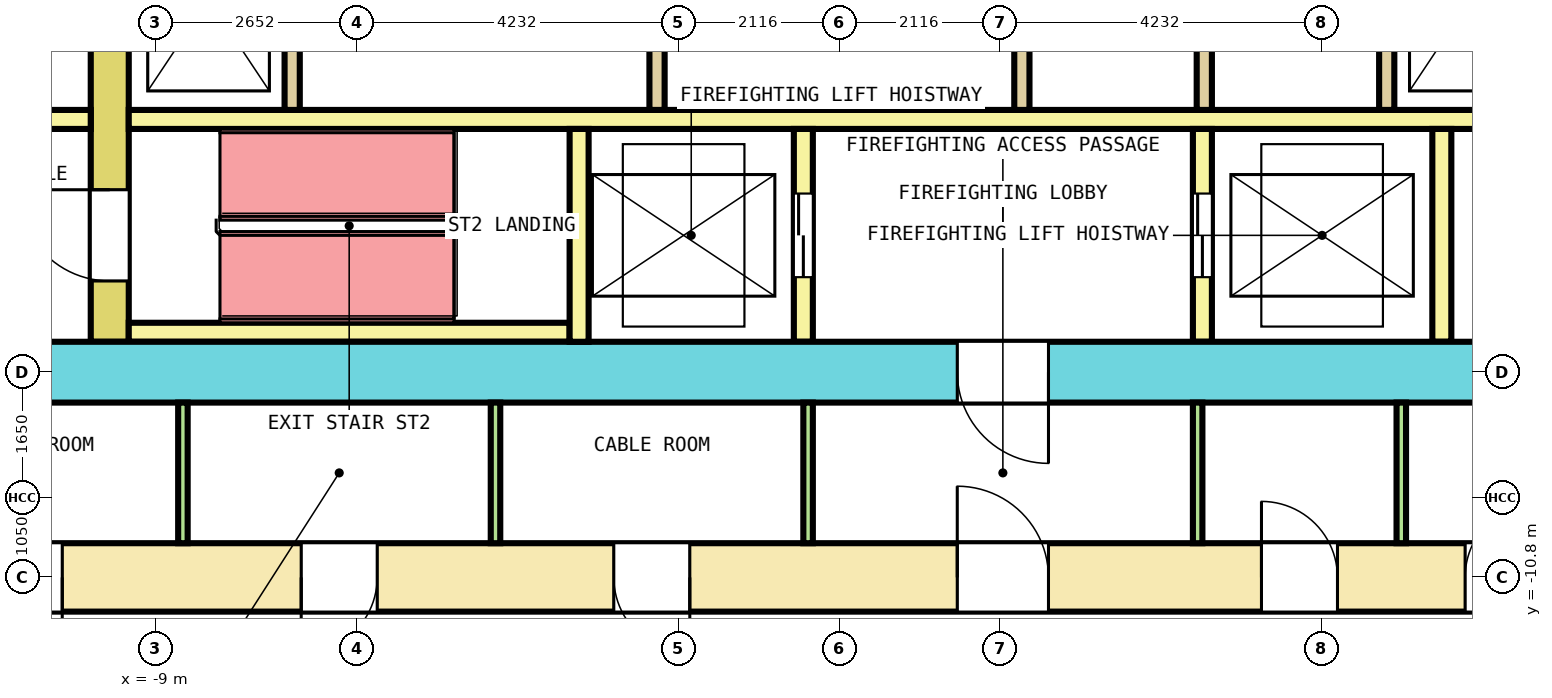
"""IFC4 building model, lengths in metres.
Left out: names, types, materials, properties, quantities, classifications, styles, units other than length and angle.
Written with IfcOpenShell. Run it as: python <this file> out.ifc"""

import sys

from ifc_helpers import new_model, si_unit, direction, frame, frame_2d, origin, place, context, subcontext, project, spatial, rectangle, extrude, element, fill, save


model = new_model("IFC4")
c1 = context("Model", 3, precision=1e-05, world=origin(), true_north=direction((0.0, 1.0)))
c2 = subcontext(c1, "Body", "Model", "MODEL_VIEW")
j1 = project(units=[si_unit("LENGTHUNIT", "METRE"), si_unit("PLANEANGLEUNIT", "RADIAN")], contexts=[c1])
p1 = place(None, origin())
s1 = spatial("IfcSite", under=j1, at=p1, CompositionType="ELEMENT")
p2 = place(p1, origin())
s2 = spatial("IfcBuilding", under=s1, at=p2, CompositionType="ELEMENT")
p3 = place(p2, frame((0.0, 0.0, 23.4)))
s3 = spatial("IfcBuildingStorey", under=s2, at=p3, CompositionType="ELEMENT", Elevation=23.4)
p4 = place(p3, frame((-13.65, -10.8, 0.0), z_axis=(0.0, 0.0, 1.0), x_axis=(1.0, 0.0, 0.0)))
e1 = element("IfcWall", 1, at=p4, inside=s3, PredefinedType="SHEAR", context=c2, shape_type="SweptSolid", body=[
    extrude(rectangle(XDim=27.3, YDim=0.9, at=frame_2d((13.65, 0.0))), origin(), (0.0, 0.0, 1.0), 4.1),
])
p5 = place(p4, frame((2.425, 0.0, 0.0)))
e2 = element("IfcOpeningElement", 2, at=p5, cuts=e1, PredefinedType="OPENING", context=c2, shape_type="SweptSolid", body=[
    extrude(rectangle(XDim=1.0, YDim=2.1, at=frame_2d((0.5, 1.05))), frame((0.0, 0.46, 0.0), z_axis=(0.0, -1.0, 0.0), x_axis=(1.0, 0.0, 0.0)), (0.0, 0.0, 1.0), 0.92),
])
p6 = place(p4, frame((6.569, 0.0, 0.0)))
e3 = element("IfcOpeningElement", 3, at=p6, cuts=e1, PredefinedType="OPENING", context=c2, shape_type="SweptSolid", body=[
    extrude(rectangle(XDim=1.0, YDim=2.1, at=frame_2d((0.5, 1.05))), frame((0.0, 0.46, 0.0), z_axis=(0.0, -1.0, 0.0), x_axis=(1.0, 0.0, 0.0)), (0.0, 0.0, 1.0), 0.92),
])
p7 = place(p4, frame((10.681, 0.0, 0.0)))
e4 = element("IfcOpeningElement", 4, at=p7, cuts=e1, PredefinedType="OPENING", context=c2, shape_type="SweptSolid", body=[
    extrude(rectangle(XDim=1.0, YDim=2.1, at=frame_2d((0.5, 1.05))), frame((0.0, 0.46, 0.0), z_axis=(0.0, -1.0, 0.0), x_axis=(1.0, 0.0, 0.0)), (0.0, 0.0, 1.0), 0.92),
])
p8 = place(p4, frame((19.202, 0.0, 0.0)))
e5 = element("IfcOpeningElement", 5, at=p8, cuts=e1, PredefinedType="OPENING", context=c2, shape_type="SweptSolid", body=[
    extrude(rectangle(XDim=1.0, YDim=2.1, at=frame_2d((0.5, 1.05))), frame((0.0, 0.46, 0.0), z_axis=(0.0, -1.0, 0.0), x_axis=(1.0, 0.0, 0.0)), (0.0, 0.0, 1.0), 0.92),
])
p9 = place(p4, frame((21.881, 0.0, 0.0)))
e6 = element("IfcOpeningElement", 6, at=p9, cuts=e1, PredefinedType="OPENING", context=c2, shape_type="SweptSolid", body=[
    extrude(rectangle(XDim=1.0, YDim=2.1, at=frame_2d((0.5, 1.05))), frame((0.0, 0.46, 0.0), z_axis=(0.0, -1.0, 0.0), x_axis=(1.0, 0.0, 0.0)), (0.0, 0.0, 1.0), 0.92),
])
p10 = place(p4, frame((24.592, 0.0, 0.0)))
e7 = element("IfcOpeningElement", 7, at=p10, cuts=e1, PredefinedType="OPENING", context=c2, shape_type="SweptSolid", body=[
    extrude(rectangle(XDim=1.0, YDim=2.1, at=frame_2d((0.5, 1.05))), frame((0.0, 0.46, 0.0), z_axis=(0.0, -1.0, 0.0), x_axis=(1.0, 0.0, 0.0)), (0.0, 0.0, 1.0), 0.92),
])
p11 = place(p4, frame((15.2, 0.0, 0.0)))
e8 = element("IfcOpeningElement", 8, at=p11, cuts=e1, PredefinedType="OPENING", context=c2, shape_type="SweptSolid", body=[
    extrude(rectangle(XDim=1.2, YDim=2.1, at=frame_2d((0.6, 1.05))), frame((0.0, 0.46, 0.0), z_axis=(0.0, -1.0, 0.0), x_axis=(1.0, 0.0, 0.0)), (0.0, 0.0, 1.0), 0.92),
])
p12 = place(p3, frame((-12.75, -8.1, 0.0), z_axis=(0.0, 0.0, 1.0), x_axis=(1.0, 0.0, 0.0)))
e9 = element("IfcWall", 9, at=p12, inside=s3, PredefinedType="SHEAR", context=c2, shape_type="SweptSolid", body=[
    extrude(rectangle(XDim=25.5, YDim=0.8, at=frame_2d((12.75, 0.0))), origin(), (0.0, 0.0, 1.0), 4.1),
])
p13 = place(p12, frame((14.3, 0.0, 0.0)))
e10 = element("IfcOpeningElement", 10, at=p13, cuts=e9, PredefinedType="OPENING", context=c2, shape_type="SweptSolid", body=[
    extrude(rectangle(XDim=1.2, YDim=2.1, at=frame_2d((0.6, 1.05))), frame((0.0, 0.41, 0.0), z_axis=(0.0, -1.0, 0.0), x_axis=(1.0, 0.0, 0.0)), (0.0, 0.0, 1.0), 0.82),
])
p14 = place(p3, frame((-9.6, -7.7, 0.0), z_axis=(0.0, 0.0, 1.0), x_axis=(0.0, 1.0, 0.0)))
e11 = element("IfcWall", 11, at=p14, inside=s3, PredefinedType="SHEAR", context=c2, shape_type="SweptSolid", body=[
    extrude(rectangle(XDim=15.4, YDim=0.5, at=frame_2d((7.7, 0.0))), origin(), (0.0, 0.0, 1.0), 4.1),
])
p15 = place(p14, frame((6.5, 0.0, 0.0)))
e12 = element("IfcOpeningElement", 12, at=p15, cuts=e11, PredefinedType="OPENING", context=c2, shape_type="SweptSolid", body=[
    extrude(rectangle(XDim=2.4, YDim=2.1, at=frame_2d((1.2, 1.05))), frame((0.0, 0.26, 0.0), z_axis=(0.0, -1.0, 0.0), x_axis=(1.0, 0.0, 0.0)), (0.0, 0.0, 1.0), 0.52),
])
p16 = place(p14, frame((13.4, 0.0, 0.0)))
e13 = element("IfcOpeningElement", 13, at=p16, cuts=e11, PredefinedType="OPENING", context=c2, shape_type="SweptSolid", body=[
    extrude(rectangle(XDim=1.2, YDim=2.1, at=frame_2d((0.6, 1.05))), frame((0.0, 0.26, 0.0), z_axis=(0.0, -1.0, 0.0), x_axis=(1.0, 0.0, 0.0)), (0.0, 0.0, 1.0), 0.52),
])
p17 = place(p14, frame((0.8, 0.0, 0.0)))
e14 = element("IfcOpeningElement", 14, at=p17, cuts=e11, PredefinedType="OPENING", context=c2, shape_type="SweptSolid", body=[
    extrude(rectangle(XDim=1.2, YDim=2.1, at=frame_2d((0.6, 1.05))), frame((0.0, 0.26, 0.0), z_axis=(0.0, -1.0, 0.0), x_axis=(1.0, 0.0, 0.0)), (0.0, 0.0, 1.0), 0.52),
])
p18 = place(p3, frame((-12.75, -4.775, 0.0), z_axis=(0.0, 0.0, 1.0), x_axis=(1.0, 0.0, 0.0)))
e15 = element("IfcWall", 15, at=p18, inside=s3, PredefinedType="SOLIDWALL", context=c2, shape_type="SweptSolid", body=[
    extrude(rectangle(XDim=2.9, YDim=0.25, at=frame_2d((1.45, 0.0))), origin(), (0.0, 0.0, 1.0), 4.1),
])
p19 = place(p3, frame((-9.35, -4.775, 0.0), z_axis=(0.0, 0.0, 1.0), x_axis=(1.0, 0.0, 0.0)))
e16 = element("IfcWall", 16, at=p19, inside=s3, PredefinedType="SOLIDWALL", context=c2, shape_type="SweptSolid", body=[
    extrude(rectangle(XDim=18.7, YDim=0.25, at=frame_2d((9.35, 0.0))), origin(), (0.0, 0.0, 1.0), 4.1),
])
for number, where, z_axis, x_axis in (
    (17, (-7.2, -4.65, 0.0), (0.0, 0.0, 1.0), (0.0, 1.0, 0.0)),
    (18, (-2.4, -4.65, 0.0), (0.0, 0.0, 1.0), (0.0, 1.0, 0.0)),
    (19, (2.4, -4.65, 0.0), (0.0, 0.0, 1.0), (0.0, 1.0, 0.0)),
    (20, (4.8, -4.65, 0.0), (0.0, 0.0, 1.0), (0.0, 1.0, 0.0)),
    (21, (7.2, -4.65, 0.0), (0.0, 0.0, 1.0), (0.0, 1.0, 0.0)),
):
    element("IfcWall", number, at=place(p3, frame(where, z_axis=z_axis, x_axis=x_axis)), inside=s3, PredefinedType="SOLIDWALL", context=c2, shape_type="SweptSolid", body=[
        extrude(rectangle(XDim=2.9, YDim=0.2, at=frame_2d((1.45, 0.0))), origin(), (0.0, 0.0, 1.0), 4.1),
    ])
p20 = place(p3, frame((-9.35, -7.575, 0.0), z_axis=(0.0, 0.0, 1.0), x_axis=(1.0, 0.0, 0.0)))
e22 = element("IfcWall", 22, at=p20, inside=s3, PredefinedType="SOLIDWALL", context=c2, shape_type="SweptSolid", body=[
    extrude(rectangle(XDim=5.8, YDim=0.25, at=frame_2d((2.9, 0.0))), origin(), (0.0, 0.0, 1.0), 4.1),
])
p21 = place(p3, frame((-3.425, -7.7, 0.0), z_axis=(0.0, 0.0, 1.0), x_axis=(0.0, 1.0, 0.0)))
e23 = element("IfcWall", 23, at=p21, inside=s3, PredefinedType="SOLIDWALL", context=c2, shape_type="SweptSolid", body=[
    extrude(rectangle(XDim=2.8, YDim=0.25, at=frame_2d((1.4, 0.0))), origin(), (0.0, 0.0, 1.0), 4.1),
])
p22 = place(p3, frame((-0.475, -7.7, 0.0), z_axis=(0.0, 0.0, 1.0), x_axis=(0.0, 1.0, 0.0)))
e24 = element("IfcWall", 24, at=p22, inside=s3, PredefinedType="SOLIDWALL", context=c2, shape_type="SweptSolid", body=[
    extrude(rectangle(XDim=2.8, YDim=0.25, at=frame_2d((1.4, 0.0))), origin(), (0.0, 0.0, 1.0), 4.1),
])
p23 = place(p22, frame((0.85, 0.0, 0.0)))
e25 = element("IfcOpeningElement", 25, at=p23, cuts=e24, PredefinedType="OPENING", context=c2, shape_type="SweptSolid", body=[
    extrude(rectangle(XDim=1.1, YDim=2.1, at=frame_2d((0.55, 1.05))), frame((0.0, 0.135, 0.0), z_axis=(0.0, -1.0, 0.0), x_axis=(1.0, 0.0, 0.0)), (0.0, 0.0, 1.0), 0.27),
])
p24 = place(p3, frame((4.775, -7.7, 0.0), z_axis=(0.0, 0.0, 1.0), x_axis=(0.0, 1.0, 0.0)))
e26 = element("IfcWall", 26, at=p24, inside=s3, PredefinedType="SOLIDWALL", context=c2, shape_type="SweptSolid", body=[
    extrude(rectangle(XDim=2.8, YDim=0.25, at=frame_2d((1.4, 0.0))), origin(), (0.0, 0.0, 1.0), 4.1),
])
p25 = place(p24, frame((0.85, 0.0, 0.0)))
e27 = element("IfcOpeningElement", 27, at=p25, cuts=e26, PredefinedType="OPENING", context=c2, shape_type="SweptSolid", body=[
    extrude(rectangle(XDim=1.1, YDim=2.1, at=frame_2d((0.55, 1.05))), frame((0.0, 0.135, 0.0), z_axis=(0.0, -1.0, 0.0), x_axis=(1.0, 0.0, 0.0)), (0.0, 0.0, 1.0), 0.27),
])
p26 = place(p3, frame((7.925, -7.7, 0.0), z_axis=(0.0, 0.0, 1.0), x_axis=(0.0, 1.0, 0.0)))
e28 = element("IfcWall", 28, at=p26, inside=s3, PredefinedType="SOLIDWALL", context=c2, shape_type="SweptSolid", body=[
    extrude(rectangle(XDim=2.8, YDim=0.25, at=frame_2d((1.4, 0.0))), origin(), (0.0, 0.0, 1.0), 4.1),
])
for number, where, z_axis, x_axis in (
    (29, (-8.637, -10.35, 0.0), (0.0, 0.0, 1.0), (0.0, 1.0, 0.0)),
    (30, (-4.525, -10.35, 0.0), (0.0, 0.0, 1.0), (0.0, 1.0, 0.0)),
    (31, (-0.413, -10.35, 0.0), (0.0, 0.0, 1.0), (0.0, 1.0, 0.0)),
    (32, (4.712, -10.35, 0.0), (0.0, 0.0, 1.0), (0.0, 1.0, 0.0)),
    (33, (7.392, -10.35, 0.0), (0.0, 0.0, 1.0), (0.0, 1.0, 0.0)),
):
    element("IfcWall", number, at=place(p3, frame(where, z_axis=z_axis, x_axis=x_axis)), inside=s3, PredefinedType="PARTITIONING", context=c2, shape_type="SweptSolid", body=[
        extrude(rectangle(XDim=1.85, YDim=0.125, at=frame_2d((0.925, 0.0))), origin(), (0.0, 0.0, 1.0), 4.1),
    ])
p27 = place(p23, origin())
e34 = element("IfcDoor", 34, at=p27, inside=s3, OperationType="DOUBLE_DOOR_SLIDING", PredefinedType="DOOR", context=c2, shape_type="SweptSolid", body=[
    extrude(rectangle(XDim=1.1, YDim=2.1, at=frame_2d((0.55, 1.05))), frame((0.0, 0.075, 0.0), z_axis=(0.0, -1.0, 0.0), x_axis=(1.0, 0.0, 0.0)), (0.0, 0.0, 1.0), 0.15),
])
fill(e25, e34)
p28 = place(p25, origin())
e35 = element("IfcDoor", 35, at=p28, inside=s3, OperationType="DOUBLE_DOOR_SLIDING", PredefinedType="DOOR", context=c2, shape_type="SweptSolid", body=[
    extrude(rectangle(XDim=1.1, YDim=2.1, at=frame_2d((0.55, 1.05))), frame((0.0, 0.075, 0.0), z_axis=(0.0, -1.0, 0.0), x_axis=(1.0, 0.0, 0.0)), (0.0, 0.0, 1.0), 0.15),
])
fill(e27, e35)
p29 = place(p17, origin())
e36 = element("IfcDoor", 36, at=p29, inside=s3, OperationType="SINGLE_SWING_LEFT", PredefinedType="DOOR", context=c2, shape_type="SweptSolid", body=[
    extrude(rectangle(XDim=1.2, YDim=2.1, at=frame_2d((0.6, 1.05))), frame((0.0, 0.2, 0.0), z_axis=(0.0, -1.0, 0.0), x_axis=(1.0, 0.0, 0.0)), (0.0, 0.0, 1.0), 0.4),
])
fill(e14, e36)
p30 = place(p13, origin())
e37 = element("IfcDoor", 37, at=p30, inside=s3, OperationType="SINGLE_SWING_LEFT", PredefinedType="DOOR", context=c2, shape_type="SweptSolid", body=[
    extrude(rectangle(XDim=1.2, YDim=2.1, at=frame_2d((0.6, 1.05))), frame((0.0, 0.3, 0.0), z_axis=(0.0, -1.0, 0.0), x_axis=(1.0, 0.0, 0.0)), (0.0, 0.0, 1.0), 0.6),
])
fill(e10, e37)
p31 = place(p5, origin())
e38 = element("IfcDoor", 38, at=p31, inside=s3, OperationType="SINGLE_SWING_LEFT", PredefinedType="DOOR", context=c2, shape_type="SweptSolid", body=[
    extrude(rectangle(XDim=1.0, YDim=2.1, at=frame_2d((0.5, 1.05))), frame((0.0, 0.3, 0.0), z_axis=(0.0, -1.0, 0.0), x_axis=(1.0, 0.0, 0.0)), (0.0, 0.0, 1.0), 0.6),
])
fill(e2, e38)
p32 = place(p6, origin())
e39 = element("IfcDoor", 39, at=p32, inside=s3, OperationType="SINGLE_SWING_RIGHT", PredefinedType="DOOR", context=c2, shape_type="SweptSolid", body=[
    extrude(rectangle(XDim=1.0, YDim=2.1, at=frame_2d((0.5, 1.05))), frame((0.0, 0.3, 0.0), z_axis=(0.0, -1.0, 0.0), x_axis=(1.0, 0.0, 0.0)), (0.0, 0.0, 1.0), 0.6),
])
fill(e3, e39)
p33 = place(p7, origin())
e40 = element("IfcDoor", 40, at=p33, inside=s3, OperationType="SINGLE_SWING_LEFT", PredefinedType="DOOR", context=c2, shape_type="SweptSolid", body=[
    extrude(rectangle(XDim=1.0, YDim=2.1, at=frame_2d((0.5, 1.05))), frame((0.0, 0.3, 0.0), z_axis=(0.0, -1.0, 0.0), x_axis=(1.0, 0.0, 0.0)), (0.0, 0.0, 1.0), 0.6),
])
fill(e4, e40)
p34 = place(p8, origin())
e41 = element("IfcDoor", 41, at=p34, inside=s3, OperationType="SINGLE_SWING_RIGHT", PredefinedType="DOOR", context=c2, shape_type="SweptSolid", body=[
    extrude(rectangle(XDim=1.0, YDim=2.1, at=frame_2d((0.5, 1.05))), frame((0.0, 0.3, 0.0), z_axis=(0.0, -1.0, 0.0), x_axis=(1.0, 0.0, 0.0)), (0.0, 0.0, 1.0), 0.6),
])
fill(e5, e41)
p35 = place(p9, origin())
e42 = element("IfcDoor", 42, at=p35, inside=s3, OperationType="SINGLE_SWING_LEFT", PredefinedType="DOOR", context=c2, shape_type="SweptSolid", body=[
    extrude(rectangle(XDim=1.0, YDim=2.1, at=frame_2d((0.5, 1.05))), frame((0.0, 0.3, 0.0), z_axis=(0.0, -1.0, 0.0), x_axis=(1.0, 0.0, 0.0)), (0.0, 0.0, 1.0), 0.6),
])
fill(e6, e42)
p36 = place(p11, origin())
e43 = element("IfcDoor", 43, at=p36, inside=s3, OperationType="SINGLE_SWING_LEFT", PredefinedType="DOOR", context=c2, shape_type="SweptSolid", body=[
    extrude(rectangle(XDim=1.2, YDim=2.1, at=frame_2d((0.6, 1.05))), frame((0.0, 0.3, 0.0), z_axis=(0.0, -1.0, 0.0), x_axis=(1.0, 0.0, 0.0)), (0.0, 0.0, 1.0), 0.6),
])
fill(e8, e43)
save(model, sys.argv[1])
